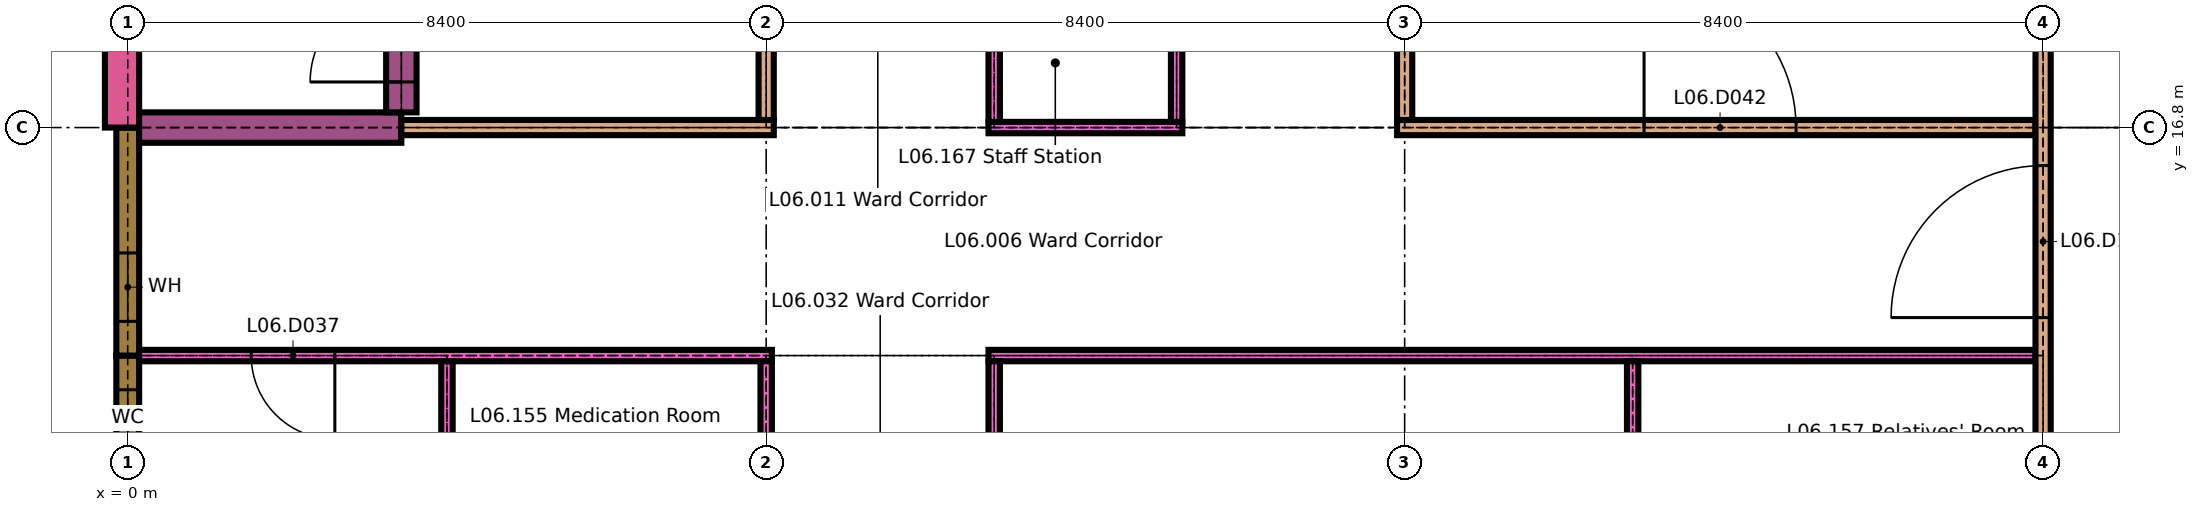
"""IFC4 building model, lengths in metres.
Left out: names, types, materials, properties, quantities, classifications, styles, units other than length and angle.
Written with IfcOpenShell. Run it as: python <this file> out.ifc"""

import sys

from ifc_helpers import new_model, si_unit, direction, frame, frame_2d, origin, place, context, subcontext, project, spatial, rectangle, extrude, element, fill, save


model = new_model("IFC4")
c1 = context("Model", 3, precision=1e-05, world=origin(), true_north=direction((0.0, 1.0)))
c2 = subcontext(c1, "Body", "Model", "MODEL_VIEW")
j1 = project(units=[si_unit("LENGTHUNIT", "METRE"), si_unit("PLANEANGLEUNIT", "RADIAN")], contexts=[c1])
p1 = place(None, origin())
s1 = spatial("IfcSite", under=j1, at=p1, CompositionType="ELEMENT")
p2 = place(p1, origin())
s2 = spatial("IfcBuilding", under=s1, at=p2, CompositionType="ELEMENT")
p3 = place(p2, frame((0.0, 0.0, 26.1)))
s3 = spatial("IfcBuildingStorey", under=s2, at=p3, CompositionType="ELEMENT", Elevation=26.1)
p4 = place(p3, frame((0.0, 11.4, 0.0), z_axis=(0.0, 0.0, 1.0), x_axis=(0.0, 1.0, 0.0)))
e1 = element("IfcWall", 1, at=p4, inside=s3, PredefinedType="SOLIDWALL", context=c2, shape_type="SweptSolid", body=[
    extrude(rectangle(XDim=2.4, YDim=0.3, at=frame_2d((1.2, 0.0))), origin(), (0.0, 0.0, 1.0), 2.9),
])
p5 = place(p4, frame((0.45, 0.0, 0.9)))
e2 = element("IfcOpeningElement", 2, at=p5, cuts=e1, PredefinedType="OPENING", context=c2, shape_type="SweptSolid", body=[
    extrude(rectangle(XDim=1.5, YDim=1.5, at=frame_2d((0.75, 0.75))), frame((0.0, 0.16, 0.0), z_axis=(0.0, -1.0, 0.0), x_axis=(1.0, 0.0, 0.0)), (0.0, 0.0, 1.0), 0.32),
])
p6 = place(p3, frame((0.0, 13.8, 0.0), z_axis=(0.0, 0.0, 1.0), x_axis=(0.0, 1.0, 0.0)))
e3 = element("IfcWall", 3, at=p6, inside=s3, PredefinedType="SOLIDWALL", context=c2, shape_type="SweptSolid", body=[
    extrude(rectangle(XDim=3.0, YDim=0.3, at=frame_2d((1.5, 0.0))), origin(), (0.0, 0.0, 1.0), 2.9),
])
p7 = place(p6, frame((0.45, 0.0, 0.9)))
e4 = element("IfcOpeningElement", 4, at=p7, cuts=e3, PredefinedType="OPENING", context=c2, shape_type="SweptSolid", body=[
    extrude(rectangle(XDim=0.9, YDim=1.5, at=frame_2d((0.45, 0.75))), frame((0.0, 0.16, 0.0), z_axis=(0.0, -1.0, 0.0), x_axis=(1.0, 0.0, 0.0)), (0.0, 0.0, 1.0), 0.32),
])
p8 = place(p3, frame((-0.075, 16.8, 0.0), z_axis=(0.0, 0.0, 1.0), x_axis=(0.0, 1.0, 0.0)))
e5 = element("IfcWall", 5, at=p8, inside=s3, PredefinedType="SOLIDWALL", context=c2, shape_type="SweptSolid", body=[
    extrude(rectangle(XDim=3.15, YDim=0.45, at=frame_2d((1.575, 0.0))), origin(), (0.0, 0.0, 1.0), 3.3),
])
p9 = place(p3, frame((0.15, 13.8, 0.0), z_axis=(0.0, 0.0, 1.0), x_axis=(1.0, 0.0, 0.0)))
e6 = element("IfcWall", 6, at=p9, inside=s3, PredefinedType="PARTITIONING", context=c2, shape_type="SweptSolid", body=[
    extrude(rectangle(XDim=8.325, YDim=0.15, at=frame_2d((4.163, 0.0))), origin(), (0.0, 0.0, 1.0), 3.3),
])
p10 = place(p9, frame((1.475, 0.0, 0.0)))
e7 = element("IfcOpeningElement", 7, at=p10, cuts=e6, PredefinedType="OPENING", context=c2, shape_type="SweptSolid", body=[
    extrude(rectangle(XDim=1.1, YDim=2.1, at=frame_2d((0.55, 1.05))), frame((0.0, 0.085, 0.0), z_axis=(0.0, -1.0, 0.0), x_axis=(1.0, 0.0, 0.0)), (0.0, 0.0, 1.0), 0.17),
])
p11 = place(p3, frame((11.325, 13.8, 0.0), z_axis=(0.0, 0.0, 1.0), x_axis=(1.0, 0.0, 0.0)))
e8 = element("IfcWall", 8, at=p11, inside=s3, PredefinedType="PARTITIONING", context=c2, shape_type="SweptSolid", body=[
    extrude(rectangle(XDim=13.775, YDim=0.15, at=frame_2d((6.888, 0.0))), origin(), (0.0, 0.0, 1.0), 3.3),
])
p12 = place(p3, frame((0.15, 16.8, 0.0), z_axis=(0.0, 0.0, 1.0), x_axis=(1.0, 0.0, 0.0)))
e9 = element("IfcWall", 9, at=p12, inside=s3, PredefinedType="SHEAR", context=c2, shape_type="SweptSolid", body=[
    extrude(rectangle(XDim=3.45, YDim=0.4, at=frame_2d((1.725, 0.0))), origin(), (0.0, 0.0, 1.0), 3.3),
])
p13 = place(p3, frame((3.6, 16.8, 0.0), z_axis=(0.0, 0.0, 1.0), x_axis=(1.0, 0.0, 0.0)))
e10 = element("IfcWall", 10, at=p13, inside=s3, PredefinedType="PARTITIONING", context=c2, shape_type="SweptSolid", body=[
    extrude(rectangle(XDim=4.9, YDim=0.2, at=frame_2d((2.45, 0.0))), origin(), (0.0, 0.0, 1.0), 3.3),
])
p14 = place(p3, frame((11.325, 16.8, 0.0), z_axis=(0.0, 0.0, 1.0), x_axis=(1.0, 0.0, 0.0)))
e11 = element("IfcWall", 11, at=p14, inside=s3, PredefinedType="PARTITIONING", context=c2, shape_type="SweptSolid", body=[
    extrude(rectangle(XDim=2.55, YDim=0.15, at=frame_2d((1.275, 0.0))), origin(), (0.0, 0.0, 1.0), 3.3),
])
p15 = place(p3, frame((16.7, 16.8, 0.0), z_axis=(0.0, 0.0, 1.0), x_axis=(1.0, 0.0, 0.0)))
e12 = element("IfcWall", 12, at=p15, inside=s3, PredefinedType="PARTITIONING", context=c2, shape_type="SweptSolid", body=[
    extrude(rectangle(XDim=8.4, YDim=0.2, at=frame_2d((4.2, 0.0))), origin(), (0.0, 0.0, 1.0), 3.3),
])
p16 = place(p15, frame((3.25, 0.0, 0.0)))
e13 = element("IfcOpeningElement", 13, at=p16, cuts=e12, PredefinedType="OPENING", context=c2, shape_type="SweptSolid", body=[
    extrude(rectangle(XDim=2.0, YDim=2.4, at=frame_2d((1.0, 1.2))), frame((0.0, 0.11, 0.0), z_axis=(0.0, -1.0, 0.0), x_axis=(1.0, 0.0, 0.0)), (0.0, 0.0, 1.0), 0.22),
])
p17 = place(p3, frame((3.6, 17.0, 0.0), z_axis=(0.0, 0.0, 1.0), x_axis=(0.0, 1.0, 0.0)))
e14 = element("IfcWall", 14, at=p17, inside=s3, PredefinedType="SHEAR", context=c2, shape_type="SweptSolid", body=[
    extrude(rectangle(XDim=8.0, YDim=0.4, at=frame_2d((4.0, 0.0))), origin(), (0.0, 0.0, 1.0), 3.3),
])
p18 = place(p17, frame((0.4, 0.0, 0.0)))
e15 = element("IfcOpeningElement", 15, at=p18, cuts=e14, PredefinedType="OPENING", context=c2, shape_type="SweptSolid", body=[
    extrude(rectangle(XDim=1.2, YDim=2.1, at=frame_2d((0.6, 1.05))), frame((0.0, 0.21, 0.0), z_axis=(0.0, -1.0, 0.0), x_axis=(1.0, 0.0, 0.0)), (0.0, 0.0, 1.0), 0.42),
])
for number, where, z_axis, x_axis in (
    (16, (4.2, 11.475, 0.0), (0.0, 0.0, 1.0), (0.0, 1.0, 0.0)),
    (17, (8.4, 11.475, 0.0), (0.0, 0.0, 1.0), (0.0, 1.0, 0.0)),
):
    element("IfcWall", number, at=place(p3, frame(where, z_axis=z_axis, x_axis=x_axis)), inside=s3, PredefinedType="PARTITIONING", context=c2, shape_type="SweptSolid", body=[
        extrude(rectangle(XDim=2.25, YDim=0.15, at=frame_2d((1.125, 0.0))), origin(), (0.0, 0.0, 1.0), 3.3),
    ])
p19 = place(p3, frame((8.4, 16.9, 0.0), z_axis=(0.0, 0.0, 1.0), x_axis=(0.0, 1.0, 0.0)))
e18 = element("IfcWall", 18, at=p19, inside=s3, PredefinedType="PARTITIONING", context=c2, shape_type="SweptSolid", body=[
    extrude(rectangle(XDim=8.2, YDim=0.2, at=frame_2d((4.1, 0.0))), origin(), (0.0, 0.0, 1.0), 3.3),
])
p20 = place(p19, frame((3.1, 0.0, 0.0)))
e19 = element("IfcOpeningElement", 19, at=p20, cuts=e18, PredefinedType="OPENING", context=c2, shape_type="SweptSolid", body=[
    extrude(rectangle(XDim=2.0, YDim=2.4, at=frame_2d((1.0, 1.2))), frame((0.0, 0.11, 0.0), z_axis=(0.0, -1.0, 0.0), x_axis=(1.0, 0.0, 0.0)), (0.0, 0.0, 1.0), 0.22),
])
p21 = place(p3, frame((11.4, 11.4, 0.0), z_axis=(0.0, 0.0, 1.0), x_axis=(0.0, 1.0, 0.0)))
e20 = element("IfcWall", 20, at=p21, inside=s3, PredefinedType="PARTITIONING", context=c2, shape_type="SweptSolid", body=[
    extrude(rectangle(XDim=2.325, YDim=0.15, at=frame_2d((1.163, 0.0))), origin(), (0.0, 0.0, 1.0), 3.3),
])
p22 = place(p3, frame((11.4, 16.875, 0.0), z_axis=(0.0, 0.0, 1.0), x_axis=(0.0, 1.0, 0.0)))
e21 = element("IfcWall", 21, at=p22, inside=s3, PredefinedType="PARTITIONING", context=c2, shape_type="SweptSolid", body=[
    extrude(rectangle(XDim=8.225, YDim=0.15, at=frame_2d((4.113, 0.0))), origin(), (0.0, 0.0, 1.0), 3.3),
])
p23 = place(p22, frame((5.625, 0.0, 0.0)))
e22 = element("IfcOpeningElement", 22, at=p23, cuts=e21, PredefinedType="OPENING", context=c2, shape_type="SweptSolid", body=[
    extrude(rectangle(XDim=1.1, YDim=2.1, at=frame_2d((0.55, 1.05))), frame((0.0, 0.085, 0.0), z_axis=(0.0, -1.0, 0.0), x_axis=(1.0, 0.0, 0.0)), (0.0, 0.0, 1.0), 0.17),
])
p24 = place(p3, frame((13.8, 16.875, 0.0), z_axis=(0.0, 0.0, 1.0), x_axis=(0.0, 1.0, 0.0)))
e23 = element("IfcWall", 23, at=p24, inside=s3, PredefinedType="PARTITIONING", context=c2, shape_type="SweptSolid", body=[
    extrude(rectangle(XDim=8.225, YDim=0.15, at=frame_2d((4.113, 0.0))), origin(), (0.0, 0.0, 1.0), 3.3),
])
p25 = place(p24, frame((1.512, 0.0, 0.0)))
e24 = element("IfcOpeningElement", 24, at=p25, cuts=e23, PredefinedType="OPENING", context=c2, shape_type="SweptSolid", body=[
    extrude(rectangle(XDim=1.1, YDim=2.1, at=frame_2d((0.55, 1.05))), frame((0.0, 0.085, 0.0), z_axis=(0.0, -1.0, 0.0), x_axis=(1.0, 0.0, 0.0)), (0.0, 0.0, 1.0), 0.17),
])
p26 = place(p3, frame((16.8, 16.9, 0.0), z_axis=(0.0, 0.0, 1.0), x_axis=(0.0, 1.0, 0.0)))
e25 = element("IfcWall", 25, at=p26, inside=s3, PredefinedType="PARTITIONING", context=c2, shape_type="SweptSolid", body=[
    extrude(rectangle(XDim=4.7, YDim=0.2, at=frame_2d((2.35, 0.0))), origin(), (0.0, 0.0, 1.0), 3.3),
])
p27 = place(p3, frame((19.8, 11.475, 0.0), z_axis=(0.0, 0.0, 1.0), x_axis=(0.0, 1.0, 0.0)))
e26 = element("IfcWall", 26, at=p27, inside=s3, PredefinedType="PARTITIONING", context=c2, shape_type="SweptSolid", body=[
    extrude(rectangle(XDim=2.25, YDim=0.15, at=frame_2d((1.125, 0.0))), origin(), (0.0, 0.0, 1.0), 3.3),
])
p28 = place(p3, frame((25.2, 8.75, 0.0), z_axis=(0.0, 0.0, 1.0), x_axis=(0.0, 1.0, 0.0)))
e27 = element("IfcWall", 27, at=p28, inside=s3, PredefinedType="PARTITIONING", context=c2, shape_type="SweptSolid", body=[
    extrude(rectangle(XDim=12.85, YDim=0.2, at=frame_2d((6.425, 0.0))), origin(), (0.0, 0.0, 1.0), 3.3),
])
p29 = place(p28, frame((0.325, 0.0, 0.0)))
e28 = element("IfcOpeningElement", 28, at=p29, cuts=e27, PredefinedType="OPENING", context=c2, shape_type="SweptSolid", body=[
    extrude(rectangle(XDim=2.0, YDim=2.4, at=frame_2d((1.0, 1.2))), frame((0.0, 0.11, 0.0), z_axis=(0.0, -1.0, 0.0), x_axis=(1.0, 0.0, 0.0)), (0.0, 0.0, 1.0), 0.22),
])
p30 = place(p28, frame((5.55, 0.0, 0.0)))
e29 = element("IfcOpeningElement", 29, at=p30, cuts=e27, PredefinedType="OPENING", context=c2, shape_type="SweptSolid", body=[
    extrude(rectangle(XDim=2.0, YDim=2.4, at=frame_2d((1.0, 1.2))), frame((0.0, 0.11, 0.0), z_axis=(0.0, -1.0, 0.0), x_axis=(1.0, 0.0, 0.0)), (0.0, 0.0, 1.0), 0.22),
])
p31 = place(p5, origin())
e30 = element("IfcWindow", 30, at=p31, inside=s3, PartitioningType="SINGLE_PANEL", PredefinedType="WINDOW", context=c2, shape_type="SweptSolid", body=[
    extrude(rectangle(XDim=1.5, YDim=1.5, at=frame_2d((0.75, 0.75))), frame((0.0, 0.03, 0.0), z_axis=(0.0, -1.0, 0.0), x_axis=(1.0, 0.0, 0.0)), (0.0, 0.0, 1.0), 0.06),
])
fill(e2, e30)
p32 = place(p7, origin())
e31 = element("IfcWindow", 31, at=p32, inside=s3, PartitioningType="SINGLE_PANEL", PredefinedType="WINDOW", context=c2, shape_type="SweptSolid", body=[
    extrude(rectangle(XDim=0.9, YDim=1.5, at=frame_2d((0.45, 0.75))), frame((0.0, 0.03, 0.0), z_axis=(0.0, -1.0, 0.0), x_axis=(1.0, 0.0, 0.0)), (0.0, 0.0, 1.0), 0.06),
])
fill(e4, e31)
p33 = place(p10, origin())
e32 = element("IfcDoor", 32, at=p33, inside=s3, OperationType="SINGLE_SWING_RIGHT", PredefinedType="DOOR", context=c2, shape_type="SweptSolid", body=[
    extrude(rectangle(XDim=1.1, YDim=2.1, at=frame_2d((0.55, 1.05))), frame((0.0, 0.025, 0.0), z_axis=(0.0, -1.0, 0.0), x_axis=(1.0, 0.0, 0.0)), (0.0, 0.0, 1.0), 0.05),
])
fill(e7, e32)
p34 = place(p16, origin())
e33 = element("IfcDoor", 33, at=p34, inside=s3, OperationType="SINGLE_SWING_RIGHT", PredefinedType="DOOR", context=c2, shape_type="SweptSolid", body=[
    extrude(rectangle(XDim=2.0, YDim=2.4, at=frame_2d((1.0, 1.2))), frame((0.0, 0.03, 0.0), z_axis=(0.0, -1.0, 0.0), x_axis=(1.0, 0.0, 0.0)), (0.0, 0.0, 1.0), 0.06),
])
fill(e13, e33)
p35 = place(p18, origin())
e34 = element("IfcDoor", 34, at=p35, inside=s3, OperationType="SINGLE_SWING_RIGHT", PredefinedType="DOOR", context=c2, shape_type="SweptSolid", body=[
    extrude(rectangle(XDim=1.2, YDim=2.1, at=frame_2d((0.6, 1.05))), frame((0.0, 0.025, 0.0), z_axis=(0.0, -1.0, 0.0), x_axis=(1.0, 0.0, 0.0)), (0.0, 0.0, 1.0), 0.05),
])
fill(e15, e34)
p36 = place(p30, origin())
e35 = element("IfcDoor", 35, at=p36, inside=s3, OperationType="SINGLE_SWING_RIGHT", PredefinedType="DOOR", context=c2, shape_type="SweptSolid", body=[
    extrude(rectangle(XDim=2.0, YDim=2.4, at=frame_2d((1.0, 1.2))), frame((0.0, 0.03, 0.0), z_axis=(0.0, -1.0, 0.0), x_axis=(1.0, 0.0, 0.0)), (0.0, 0.0, 1.0), 0.06),
])
fill(e29, e35)
save(model, sys.argv[1])
